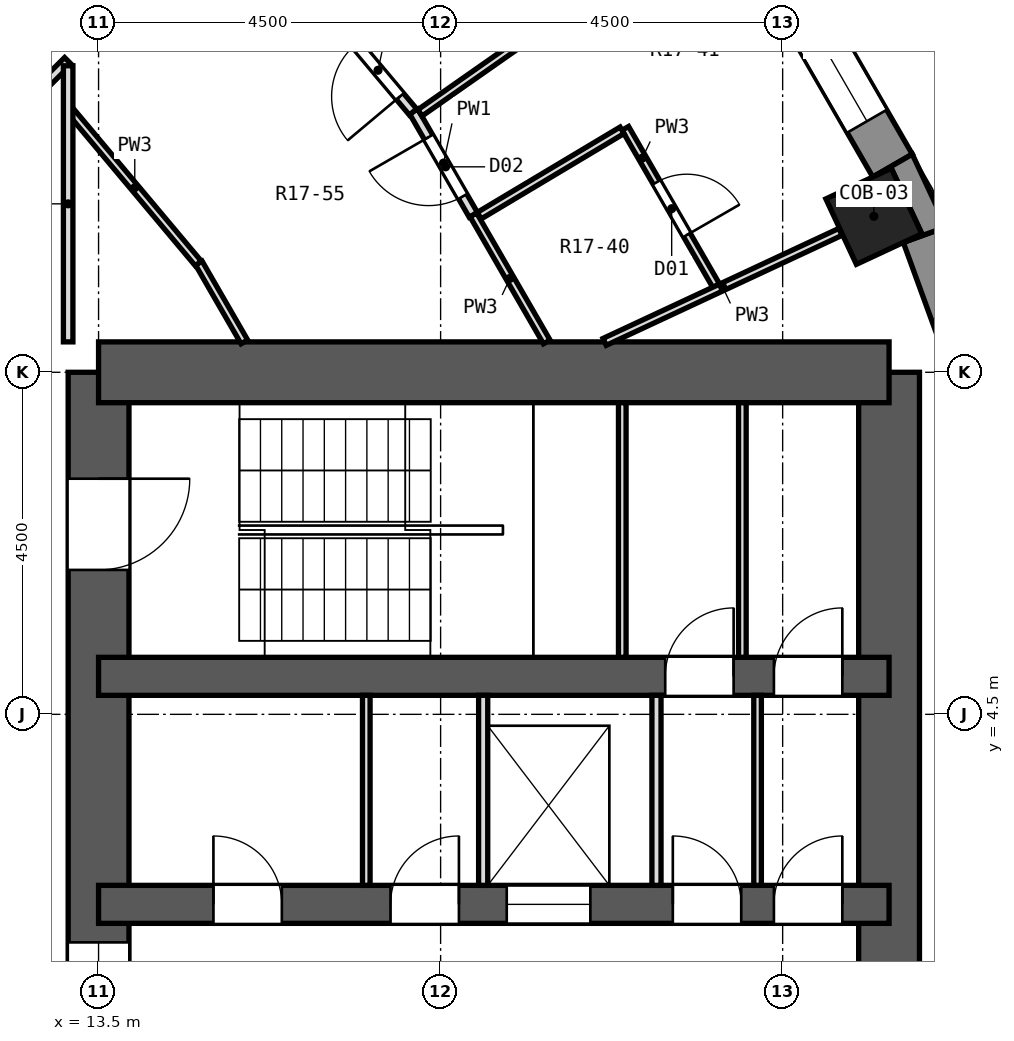
"""IFC4 building model, lengths in metres.
Left out: names, types, materials, properties, quantities, classifications, styles, units other than length and angle.
Written with IfcOpenShell. Run it as: python <this file> out.ifc"""

import sys

from ifc_helpers import new_model, si_unit, direction, frame, frame_2d, origin, origin_2d, place, context, subcontext, project, spatial, polyline, rectangle, outline, extrude, element, fill, save


model = new_model("IFC4")
c1 = context("Model", 3, precision=1e-05, world=origin(), true_north=direction((0.0, 1.0)))
c2 = subcontext(c1, "Body", "Model", "MODEL_VIEW")
j1 = project(units=[si_unit("LENGTHUNIT", "METRE"), si_unit("PLANEANGLEUNIT", "RADIAN")], contexts=[c1])
p1 = place(None, origin())
s1 = spatial("IfcSite", under=j1, at=p1, CompositionType="ELEMENT")
p2 = place(p1, origin())
s2 = spatial("IfcBuilding", under=s1, at=p2, CompositionType="ELEMENT")
p3 = place(p2, frame((0.0, 0.0, 91.9)))
s3 = spatial("IfcBuildingStorey", under=s2, at=p3, CompositionType="ELEMENT", Elevation=91.9)
p4 = place(p3, frame((23.7, 11.052, 0.0), z_axis=(0.0, 0.0, 1.0), x_axis=(0.906307787037, 0.422618261741, 0.0)))
e1 = element("IfcColumn", 1, at=p4, inside=s3, PredefinedType="COLUMN", context=c2, shape_type="SweptSolid", body=[
    extrude(rectangle(XDim=0.95, YDim=0.95, at=origin_2d()), origin(), (0.0, 0.0, 1.0), 3.3),
])
p5 = place(p3, frame((13.5, -9.0, 0.0), z_axis=(0.0, 0.0, 1.0), x_axis=(0.0, 1.0, 0.0)))
e2 = element("IfcWall", 2, at=p5, inside=s3, PredefinedType="SHEAR", context=c2, shape_type="SweptSolid", body=[
    extrude(rectangle(XDim=18.0, YDim=0.8, at=frame_2d((9.0, 0.0))), origin(), (0.0, 0.0, 1.0), 3.3),
])
p6 = place(p5, frame((15.4, 0.0, 0.0)))
e3 = element("IfcOpeningElement", 3, at=p6, cuts=e2, PredefinedType="OPENING", context=c2, shape_type="SweptSolid", body=[
    extrude(rectangle(XDim=1.2, YDim=2.1, at=frame_2d((0.6, 1.05))), frame((0.0, 0.412, 0.0), z_axis=(0.0, -1.0, 0.0), x_axis=(1.0, 0.0, 0.0)), (0.0, 0.0, 1.0), 0.824),
])
p7 = place(p5, frame((1.4, 0.0, 0.0)))
e4 = element("IfcOpeningElement", 4, at=p7, cuts=e2, PredefinedType="OPENING", context=c2, shape_type="SweptSolid", body=[
    extrude(rectangle(XDim=1.2, YDim=2.1, at=frame_2d((0.6, 1.05))), frame((0.0, 0.412, 0.0), z_axis=(0.0, -1.0, 0.0), x_axis=(1.0, 0.0, 0.0)), (0.0, 0.0, 1.0), 0.824),
])
p8 = place(p5, frame((7.5, 0.0, 0.0)))
e5 = element("IfcOpeningElement", 5, at=p8, cuts=e2, PredefinedType="OPENING", context=c2, shape_type="SweptSolid", body=[
    extrude(rectangle(XDim=3.0, YDim=2.4, at=frame_2d((1.5, 1.2))), frame((0.0, 0.412, 0.0), z_axis=(0.0, -1.0, 0.0), x_axis=(1.0, 0.0, 0.0)), (0.0, 0.0, 1.0), 0.824),
])
p9 = place(p3, frame((23.9, -9.0, 0.0), z_axis=(0.0, 0.0, 1.0), x_axis=(0.0, 1.0, 0.0)))
e6 = element("IfcWall", 6, at=p9, inside=s3, PredefinedType="SHEAR", context=c2, shape_type="SweptSolid", body=[
    extrude(rectangle(XDim=18.0, YDim=0.8, at=frame_2d((9.0, 0.0))), origin(), (0.0, 0.0, 1.0), 3.3),
])
p10 = place(p3, frame((13.5, 9.0, 0.0), z_axis=(0.0, 0.0, 1.0), x_axis=(1.0, 0.0, 0.0)))
e7 = element("IfcWall", 7, at=p10, inside=s3, PredefinedType="SHEAR", context=c2, shape_type="SweptSolid", body=[
    extrude(rectangle(XDim=10.4, YDim=0.8, at=frame_2d((5.2, 0.0))), origin(), (0.0, 0.0, 1.0), 3.3),
])
p11 = place(p3, frame((13.5, 5.0, 0.0), z_axis=(0.0, 0.0, 1.0), x_axis=(1.0, 0.0, 0.0)))
e8 = element("IfcWall", 8, at=p11, inside=s3, PredefinedType="SHEAR", context=c2, shape_type="SweptSolid", body=[
    extrude(rectangle(XDim=10.4, YDim=0.5, at=frame_2d((5.2, 0.0))), origin(), (0.0, 0.0, 1.0), 3.3),
])
p12 = place(p11, frame((7.455, 0.0, 0.0)))
e9 = element("IfcOpeningElement", 9, at=p12, cuts=e8, PredefinedType="OPENING", context=c2, shape_type="SweptSolid", body=[
    extrude(rectangle(XDim=0.9, YDim=2.1, at=frame_2d((0.45, 1.05))), frame((0.0, 0.262, 0.0), z_axis=(0.0, -1.0, 0.0), x_axis=(1.0, 0.0, 0.0)), (0.0, 0.0, 1.0), 0.524),
])
p13 = place(p11, frame((8.885, 0.0, 0.0)))
e10 = element("IfcOpeningElement", 10, at=p13, cuts=e8, PredefinedType="OPENING", context=c2, shape_type="SweptSolid", body=[
    extrude(rectangle(XDim=0.9, YDim=2.1, at=frame_2d((0.45, 1.05))), frame((0.0, 0.262, 0.0), z_axis=(0.0, -1.0, 0.0), x_axis=(1.0, 0.0, 0.0)), (0.0, 0.0, 1.0), 0.524),
])
p14 = place(p3, frame((13.5, 2.0, 0.0), z_axis=(0.0, 0.0, 1.0), x_axis=(1.0, 0.0, 0.0)))
e11 = element("IfcWall", 11, at=p14, inside=s3, PredefinedType="SHEAR", context=c2, shape_type="SweptSolid", body=[
    extrude(rectangle(XDim=10.4, YDim=0.5, at=frame_2d((5.2, 0.0))), origin(), (0.0, 0.0, 1.0), 3.3),
])
p15 = place(p14, frame((5.37, 0.0, 0.0)))
e12 = element("IfcOpeningElement", 12, at=p15, cuts=e11, PredefinedType="OPENING", context=c2, shape_type="SweptSolid", body=[
    extrude(rectangle(XDim=1.1, YDim=2.1, at=frame_2d((0.55, 1.05))), frame((0.0, 0.262, 0.0), z_axis=(0.0, -1.0, 0.0), x_axis=(1.0, 0.0, 0.0)), (0.0, 0.0, 1.0), 0.524),
])
p16 = place(p14, frame((1.511, 0.0, 0.0)))
e13 = element("IfcOpeningElement", 13, at=p16, cuts=e11, PredefinedType="OPENING", context=c2, shape_type="SweptSolid", body=[
    extrude(rectangle(XDim=0.9, YDim=2.1, at=frame_2d((0.45, 1.05))), frame((0.0, 0.262, 0.0), z_axis=(0.0, -1.0, 0.0), x_axis=(1.0, 0.0, 0.0)), (0.0, 0.0, 1.0), 0.524),
])
p17 = place(p14, frame((3.841, 0.0, 0.0)))
e14 = element("IfcOpeningElement", 14, at=p17, cuts=e11, PredefinedType="OPENING", context=c2, shape_type="SweptSolid", body=[
    extrude(rectangle(XDim=0.9, YDim=2.1, at=frame_2d((0.45, 1.05))), frame((0.0, 0.262, 0.0), z_axis=(0.0, -1.0, 0.0), x_axis=(1.0, 0.0, 0.0)), (0.0, 0.0, 1.0), 0.524),
])
p18 = place(p14, frame((7.555, 0.0, 0.0)))
e15 = element("IfcOpeningElement", 15, at=p18, cuts=e11, PredefinedType="OPENING", context=c2, shape_type="SweptSolid", body=[
    extrude(rectangle(XDim=0.9, YDim=2.1, at=frame_2d((0.45, 1.05))), frame((0.0, 0.262, 0.0), z_axis=(0.0, -1.0, 0.0), x_axis=(1.0, 0.0, 0.0)), (0.0, 0.0, 1.0), 0.524),
])
p19 = place(p14, frame((8.885, 0.0, 0.0)))
e16 = element("IfcOpeningElement", 16, at=p19, cuts=e11, PredefinedType="OPENING", context=c2, shape_type="SweptSolid", body=[
    extrude(rectangle(XDim=0.9, YDim=2.1, at=frame_2d((0.45, 1.05))), frame((0.0, 0.262, 0.0), z_axis=(0.0, -1.0, 0.0), x_axis=(1.0, 0.0, 0.0)), (0.0, 0.0, 1.0), 0.524),
])
p20 = place(p3, frame((25.617, 7.383, 0.0), z_axis=(0.0, 0.0, 1.0), x_axis=(-0.341990236633, 0.939703505393, 0.0)))
e17 = element("IfcWall", 17, at=p20, inside=s3, PredefinedType="SOLIDWALL", context=c2, shape_type="SweptSolid", body=[
    extrude(rectangle(XDim=3.648, YDim=0.6, at=frame_2d((1.824, 0.0))), origin(), (0.0, 0.0, 1.0), 2.8),
])
p21 = place(p3, frame((23.946, 11.719, 0.0), z_axis=(0.0, 0.0, 1.0), x_axis=(-0.499954196102, 0.866051847062, 0.0)))
e18 = element("IfcWall", 18, at=p21, inside=s3, PredefinedType="SOLIDWALL", context=c2, shape_type="SweptSolid", body=[
    extrude(rectangle(XDim=3.648, YDim=0.6, at=frame_2d((1.824, 0.0))), origin(), (0.0, 0.0, 1.0), 2.8),
])
p22 = place(p21, frame((0.674, 0.0, 0.9)))
e19 = element("IfcOpeningElement", 19, at=p22, cuts=e18, PredefinedType="OPENING", context=c2, shape_type="SweptSolid", body=[
    extrude(rectangle(XDim=2.3, YDim=1.8, at=frame_2d((1.15, 0.9))), frame((0.0, 0.312, 0.0), z_axis=(0.0, -1.0, 0.0), x_axis=(1.0, 0.0, 0.0)), (0.0, 0.0, 1.0), 0.624),
])
p23 = place(p3, origin())
e20 = element("IfcWall", 20, at=p23, inside=s3, PredefinedType="SOLIDWALL", context=c2, shape_type="SweptSolid", body=[
    extrude(outline(polyline([(24.651, 10.913), (24.206, 11.869), (23.686, 11.569), (23.93, 11.683), (24.331, 10.822), (24.087, 10.708), (24.651, 10.913)])), origin(), (0.0, 0.0, 1.0), 2.8),
])
p24 = place(p3, frame((14.819, 10.438, 0.0), z_axis=(0.0, 0.0, 1.0), x_axis=(0.500016292001, -0.866015997389, 0.0)))
e21 = element("IfcWall", 21, at=p24, inside=s3, PredefinedType="PARTITIONING", context=c2, shape_type="SweptSolid", body=[
    extrude(rectangle(XDim=1.199, YDim=0.1, at=frame_2d((0.599, 0.0))), origin(), (0.0, 0.0, 1.0), 2.8),
])
p25 = place(p3, frame((18.43, 11.072, 0.0), z_axis=(0.0, 0.0, 1.0), x_axis=(0.500203884267, -0.865907659144, 0.0)))
e22 = element("IfcWall", 22, at=p25, inside=s3, PredefinedType="PARTITIONING", context=c2, shape_type="SweptSolid", body=[
    extrude(rectangle(XDim=1.931, YDim=0.1, at=frame_2d((0.966, 0.0))), origin(), (0.0, 0.0, 1.0), 2.8),
])
p26 = place(p3, frame((17.645, 12.432, 0.0), z_axis=(0.0, 0.0, 1.0), x_axis=(0.499852597388, -0.866110489998, 0.0)))
e23 = element("IfcWall", 23, at=p26, inside=s3, PredefinedType="PARTITIONING", context=c2, shape_type="SweptSolid", body=[
    extrude(rectangle(XDim=1.57, YDim=0.125, at=frame_2d((0.785, 0.0))), origin(), (0.0, 0.0, 1.0), 2.8),
])
p27 = place(p26, frame((0.392, 0.0, 0.0)))
e24 = element("IfcOpeningElement", 24, at=p27, cuts=e23, PredefinedType="OPENING", context=c2, shape_type="SweptSolid", body=[
    extrude(rectangle(XDim=0.9, YDim=2.1, at=frame_2d((0.45, 1.05))), frame((0.0, 0.074, 0.0), z_axis=(0.0, -1.0, 0.0), x_axis=(1.0, 0.0, 0.0)), (0.0, 0.0, 1.0), 0.149),
])
p28 = place(p3, frame((20.43, 12.209, 0.0), z_axis=(0.0, 0.0, 1.0), x_axis=(0.500061428766, -0.865989934965, 0.0)))
e25 = element("IfcWall", 25, at=p28, inside=s3, PredefinedType="PARTITIONING", context=c2, shape_type="SweptSolid", body=[
    extrude(rectangle(XDim=2.39, YDim=0.1, at=frame_2d((1.195, 0.0))), origin(), (0.0, 0.0, 1.0), 2.8),
])
p29 = place(p28, frame((0.82, 0.0, 0.0)))
e26 = element("IfcOpeningElement", 26, at=p29, cuts=e25, PredefinedType="OPENING", context=c2, shape_type="SweptSolid", body=[
    extrude(rectangle(XDim=0.8, YDim=2.1, at=frame_2d((0.4, 1.05))), frame((0.0, 0.062, 0.0), z_axis=(0.0, -1.0, 0.0), x_axis=(1.0, 0.0, 0.0)), (0.0, 0.0, 1.0), 0.124),
])
p30 = place(p3, frame((13.14, 12.425, 0.0), z_axis=(0.0, 0.0, 1.0), x_axis=(0.642692247105, -0.766124451712, 0.0)))
e27 = element("IfcWall", 27, at=p30, inside=s3, PredefinedType="PARTITIONING", context=c2, shape_type="SweptSolid", body=[
    extrude(rectangle(XDim=2.601, YDim=0.1, at=frame_2d((1.301, 0.0))), origin(), (0.0, 0.0, 1.0), 2.8),
])
p31 = place(p3, frame((16.708, 13.532, 0.0), z_axis=(0.0, 0.0, 1.0), x_axis=(0.642641061866, -0.766167387458, 0.0)))
e28 = element("IfcWall", 28, at=p31, inside=s3, PredefinedType="PARTITIONING", context=c2, shape_type="SweptSolid", body=[
    extrude(rectangle(XDim=1.445, YDim=0.125, at=frame_2d((0.722, 0.0))), origin(), (0.0, 0.0, 1.0), 2.8),
])
p32 = place(p31, frame((0.279, 0.0, 0.0)))
e29 = element("IfcOpeningElement", 29, at=p32, cuts=e28, PredefinedType="OPENING", context=c2, shape_type="SweptSolid", body=[
    extrude(rectangle(XDim=0.9, YDim=2.1, at=frame_2d((0.45, 1.05))), frame((0.0, 0.074, 0.0), z_axis=(0.0, -1.0, 0.0), x_axis=(1.0, 0.0, 0.0)), (0.0, 0.0, 1.0), 0.149),
])
p33 = place(p3, frame((20.158, 9.4, 0.0), z_axis=(0.0, 0.0, 1.0), x_axis=(0.906223222272, 0.422799564114, 0.0)))
e30 = element("IfcWall", 30, at=p33, inside=s3, PredefinedType="PARTITIONING", context=c2, shape_type="SweptSolid", body=[
    extrude(rectangle(XDim=3.423, YDim=0.1, at=frame_2d((1.711, 0.0))), origin(), (0.0, 0.0, 1.0), 2.8),
])
p34 = place(p3, frame((18.509, 11.061, 0.0), z_axis=(0.0, 0.0, 1.0), x_axis=(0.85844638645, 0.512903306279, 0.0)))
e31 = element("IfcWall", 31, at=p34, inside=s3, PredefinedType="PARTITIONING", context=c2, shape_type="SweptSolid", body=[
    extrude(rectangle(XDim=2.188, YDim=0.1, at=frame_2d((1.094, 0.0))), origin(), (0.0, 0.0, 1.0), 2.8),
])
p35 = place(p3, frame((17.728, 12.413, 0.0), z_axis=(0.0, 0.0, 1.0), x_axis=(0.819106461113, 0.573641530368, 0.0)))
e32 = element("IfcWall", 32, at=p35, inside=s3, PredefinedType="PARTITIONING", context=c2, shape_type="SweptSolid", body=[
    extrude(rectangle(XDim=4.023, YDim=0.1, at=frame_2d((2.012, 0.0))), origin(), (0.0, 0.0, 1.0), 2.8),
])
p36 = place(p3, frame((7.844, 7.861, 0.0), z_axis=(0.0, 0.0, 1.0), x_axis=(0.708356490253, 0.705854859526, 0.0)))
e33 = element("IfcWall", 33, at=p36, inside=s3, PredefinedType="PARTITIONING", context=c2, shape_type="SweptSolid", body=[
    extrude(rectangle(XDim=7.417, YDim=0.125, at=frame_2d((3.708, 0.0))), origin(), (0.0, 0.0, 1.0), 2.8),
])
p37 = place(p3, frame((13.1, 9.4, 0.0), z_axis=(0.0, 0.0, 1.0), x_axis=(0.0, 1.0, 0.0)))
e34 = element("IfcWall", 34, at=p37, inside=s3, PredefinedType="PARTITIONING", context=c2, shape_type="SweptSolid", body=[
    extrude(rectangle(XDim=3.633, YDim=0.125, at=frame_2d((1.816, 0.0))), origin(), (0.0, 0.0, 1.0), 2.8),
])
p38 = place(p3, frame((17.022, 2.25, 0.0), z_axis=(0.0, 0.0, 1.0), x_axis=(0.0, 1.0, 0.0)))
e35 = element("IfcWall", 35, at=p38, inside=s3, PredefinedType="PARTITIONING", context=c2, shape_type="SweptSolid", body=[
    extrude(rectangle(XDim=2.5, YDim=0.1, at=frame_2d((1.25, 0.0))), origin(), (0.0, 0.0, 1.0), 2.8),
])
for number, where, z_axis, x_axis in (
    (36, (18.56, 2.25, 0.0), (0.0, 0.0, 1.0), (0.0, 1.0, 0.0)),
    (37, (20.84, 2.25, 0.0), (0.0, 0.0, 1.0), (0.0, 1.0, 0.0)),
):
    element("IfcWall", number, at=place(p3, frame(where, z_axis=z_axis, x_axis=x_axis)), inside=s3, PredefinedType="PARTITIONING", context=c2, shape_type="SweptSolid", body=[
        extrude(rectangle(XDim=2.5, YDim=0.12, at=frame_2d((1.25, 0.0))), origin(), (0.0, 0.0, 1.0), 2.8),
    ])
p39 = place(p3, frame((22.17, 2.25, 0.0), z_axis=(0.0, 0.0, 1.0), x_axis=(0.0, 1.0, 0.0)))
e38 = element("IfcWall", 38, at=p39, inside=s3, PredefinedType="PARTITIONING", context=c2, shape_type="SweptSolid", body=[
    extrude(rectangle(XDim=2.5, YDim=0.1, at=frame_2d((1.25, 0.0))), origin(), (0.0, 0.0, 1.0), 2.8),
])
for number, where, z_axis, x_axis in (
    (39, (20.39, 5.25, 0.0), (0.0, 0.0, 1.0), (0.0, 1.0, 0.0)),
    (40, (21.97, 5.25, 0.0), (0.0, 0.0, 1.0), (0.0, 1.0, 0.0)),
):
    element("IfcWall", number, at=place(p3, frame(where, z_axis=z_axis, x_axis=x_axis)), inside=s3, PredefinedType="PARTITIONING", context=c2, shape_type="SweptSolid", body=[
        extrude(rectangle(XDim=3.35, YDim=0.1, at=frame_2d((1.675, 0.0))), origin(), (0.0, 0.0, 1.0), 2.8),
    ])
p40 = place(p22, origin())
e41 = element("IfcWindow", 41, at=p40, inside=s3, PartitioningType="SINGLE_PANEL", PredefinedType="WINDOW", context=c2, shape_type="SweptSolid", body=[
    extrude(rectangle(XDim=2.3, YDim=1.8, at=frame_2d((1.15, 0.9))), frame((0.0, 0.18, 0.0), z_axis=(0.0, -1.0, 0.0), x_axis=(1.0, 0.0, 0.0)), (0.0, 0.0, 1.0), 0.06),
])
fill(e19, e41)
p41 = place(p29, origin())
e42 = element("IfcDoor", 42, at=p41, inside=s3, OperationType="SINGLE_SWING_RIGHT", PredefinedType="DOOR", context=c2, shape_type="SweptSolid", body=[
    extrude(rectangle(XDim=0.8, YDim=2.1, at=frame_2d((0.4, 1.05))), frame((0.0, 0.025, 0.0), z_axis=(0.0, -1.0, 0.0), x_axis=(1.0, 0.0, 0.0)), (0.0, 0.0, 1.0), 0.05),
])
fill(e26, e42)
p42 = place(p27, frame((0.9, 0.0, 0.0), z_axis=(0.0, 0.0, 1.0), x_axis=(-1.0, 0.0, 0.0)))
e43 = element("IfcDoor", 43, at=p42, inside=s3, OperationType="SINGLE_SWING_RIGHT", PredefinedType="DOOR", context=c2, shape_type="SweptSolid", body=[
    extrude(rectangle(XDim=0.9, YDim=2.1, at=frame_2d((0.45, 1.05))), frame((0.0, 0.025, 0.0), z_axis=(0.0, -1.0, 0.0), x_axis=(1.0, 0.0, 0.0)), (0.0, 0.0, 1.0), 0.05),
])
fill(e24, e43)
p43 = place(p32, frame((0.9, 0.0, 0.0), z_axis=(0.0, 0.0, 1.0), x_axis=(-1.0, 0.0, 0.0)))
e44 = element("IfcDoor", 44, at=p43, inside=s3, OperationType="SINGLE_SWING_LEFT", PredefinedType="DOOR", context=c2, shape_type="SweptSolid", body=[
    extrude(rectangle(XDim=0.9, YDim=2.1, at=frame_2d((0.45, 1.05))), frame((0.0, 0.025, 0.0), z_axis=(0.0, -1.0, 0.0), x_axis=(1.0, 0.0, 0.0)), (0.0, 0.0, 1.0), 0.05),
])
fill(e29, e44)
p44 = place(p15, origin())
e45 = element("IfcDoor", 45, at=p44, inside=s3, OperationType="DOUBLE_DOOR_SLIDING", PredefinedType="DOOR", context=c2, shape_type="SweptSolid", body=[
    extrude(rectangle(XDim=1.1, YDim=2.1, at=frame_2d((0.55, 1.05))), frame((0.0, 0.025, 0.0), z_axis=(0.0, -1.0, 0.0), x_axis=(1.0, 0.0, 0.0)), (0.0, 0.0, 1.0), 0.05),
])
fill(e12, e45)
p45 = place(p16, origin())
e46 = element("IfcDoor", 46, at=p45, inside=s3, OperationType="SINGLE_SWING_LEFT", PredefinedType="DOOR", context=c2, shape_type="SweptSolid", body=[
    extrude(rectangle(XDim=0.9, YDim=2.1, at=frame_2d((0.45, 1.05))), frame((0.0, 0.025, 0.0), z_axis=(0.0, -1.0, 0.0), x_axis=(1.0, 0.0, 0.0)), (0.0, 0.0, 1.0), 0.05),
])
fill(e13, e46)
p46 = place(p17, origin())
e47 = element("IfcDoor", 47, at=p46, inside=s3, OperationType="SINGLE_SWING_RIGHT", PredefinedType="DOOR", context=c2, shape_type="SweptSolid", body=[
    extrude(rectangle(XDim=0.9, YDim=2.1, at=frame_2d((0.45, 1.05))), frame((0.0, 0.025, 0.0), z_axis=(0.0, -1.0, 0.0), x_axis=(1.0, 0.0, 0.0)), (0.0, 0.0, 1.0), 0.05),
])
fill(e14, e47)
p47 = place(p18, origin())
e48 = element("IfcDoor", 48, at=p47, inside=s3, OperationType="SINGLE_SWING_LEFT", PredefinedType="DOOR", context=c2, shape_type="SweptSolid", body=[
    extrude(rectangle(XDim=0.9, YDim=2.1, at=frame_2d((0.45, 1.05))), frame((0.0, 0.025, 0.0), z_axis=(0.0, -1.0, 0.0), x_axis=(1.0, 0.0, 0.0)), (0.0, 0.0, 1.0), 0.05),
])
fill(e15, e48)
p48 = place(p19, origin())
e49 = element("IfcDoor", 49, at=p48, inside=s3, OperationType="SINGLE_SWING_RIGHT", PredefinedType="DOOR", context=c2, shape_type="SweptSolid", body=[
    extrude(rectangle(XDim=0.9, YDim=2.1, at=frame_2d((0.45, 1.05))), frame((0.0, 0.025, 0.0), z_axis=(0.0, -1.0, 0.0), x_axis=(1.0, 0.0, 0.0)), (0.0, 0.0, 1.0), 0.05),
])
fill(e16, e49)
p49 = place(p12, origin())
e50 = element("IfcDoor", 50, at=p49, inside=s3, OperationType="SINGLE_SWING_RIGHT", PredefinedType="DOOR", context=c2, shape_type="SweptSolid", body=[
    extrude(rectangle(XDim=0.9, YDim=2.1, at=frame_2d((0.45, 1.05))), frame((0.0, 0.025, 0.0), z_axis=(0.0, -1.0, 0.0), x_axis=(1.0, 0.0, 0.0)), (0.0, 0.0, 1.0), 0.05),
])
fill(e9, e50)
p50 = place(p13, origin())
e51 = element("IfcDoor", 51, at=p50, inside=s3, OperationType="SINGLE_SWING_RIGHT", PredefinedType="DOOR", context=c2, shape_type="SweptSolid", body=[
    extrude(rectangle(XDim=0.9, YDim=2.1, at=frame_2d((0.45, 1.05))), frame((0.0, 0.025, 0.0), z_axis=(0.0, -1.0, 0.0), x_axis=(1.0, 0.0, 0.0)), (0.0, 0.0, 1.0), 0.05),
])
fill(e10, e51)
p51 = place(p6, frame((1.2, 0.0, 0.0), z_axis=(0.0, 0.0, 1.0), x_axis=(-1.0, 0.0, 0.0)))
e52 = element("IfcDoor", 52, at=p51, inside=s3, OperationType="SINGLE_SWING_LEFT", PredefinedType="DOOR", context=c2, shape_type="SweptSolid", body=[
    extrude(rectangle(XDim=1.2, YDim=2.1, at=frame_2d((0.6, 1.05))), frame((0.0, 0.025, 0.0), z_axis=(0.0, -1.0, 0.0), x_axis=(1.0, 0.0, 0.0)), (0.0, 0.0, 1.0), 0.05),
])
fill(e3, e52)
p52 = place(p8, origin())
e53 = element("IfcDoor", 53, at=p52, inside=s3, OperationType="DOUBLE_DOOR_SLIDING", PredefinedType="DOOR", context=c2, shape_type="SweptSolid", body=[
    extrude(rectangle(XDim=3.0, YDim=2.4, at=frame_2d((1.5, 1.2))), frame((0.0, 0.025, 0.0), z_axis=(0.0, -1.0, 0.0), x_axis=(1.0, 0.0, 0.0)), (0.0, 0.0, 1.0), 0.05),
])
fill(e5, e53)
save(model, sys.argv[1])
